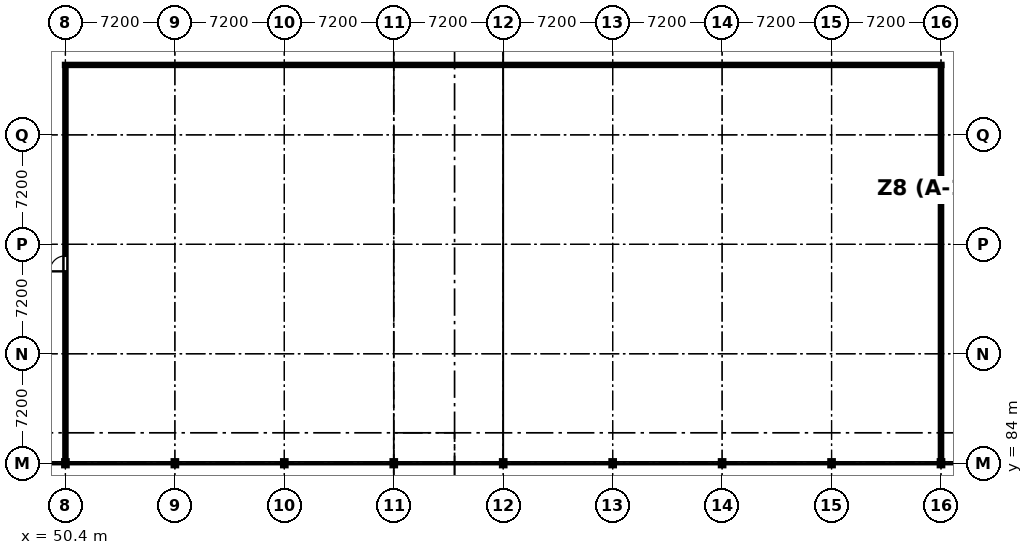
"""IFC4 building model, lengths in metres.
Left out: names, types, materials, properties, quantities, classifications, styles, units other than length and angle.
Written with IfcOpenShell. Run it as: python <this file> out.ifc"""

import sys

from ifc_helpers import new_model, si_unit, direction, frame, frame_2d, origin, origin_2d, place, context, subcontext, project, spatial, rectangle, i_section, extrude, element, fill, save


model = new_model("IFC4")
c1 = context("Model", 3, precision=1e-05, world=origin(), true_north=direction((0.0, 1.0)))
c2 = subcontext(c1, "Body", "Model", "MODEL_VIEW")
j1 = project(units=[si_unit("LENGTHUNIT", "METRE"), si_unit("PLANEANGLEUNIT", "RADIAN")], contexts=[c1])
p1 = place(None, origin())
s1 = spatial("IfcSite", under=j1, at=p1, CompositionType="ELEMENT")
p2 = place(p1, origin())
s2 = spatial("IfcBuilding", under=s1, at=p2, CompositionType="ELEMENT")
p3 = place(p2, frame((0.0, 0.0, 21.0)))
s3 = spatial("IfcBuildingStorey", under=s2, at=p3, CompositionType="ELEMENT", Elevation=21.0)
for number, where, z_axis, x_axis in (
    (1, (50.4, 84.0, 0.0), (0.0, 0.0, 1.0), (1.0, 0.0, 0.0)),
    (2, (57.6, 84.0, 0.0), (0.0, 0.0, 1.0), (1.0, 0.0, 0.0)),
    (3, (64.8, 84.0, 0.0), (0.0, 0.0, 1.0), (1.0, 0.0, 0.0)),
    (4, (72.0, 84.0, 0.0), (0.0, 0.0, 1.0), (1.0, 0.0, 0.0)),
    (5, (79.2, 84.0, 0.0), (0.0, 0.0, 1.0), (1.0, 0.0, 0.0)),
    (6, (86.4, 84.0, 0.0), (0.0, 0.0, 1.0), (1.0, 0.0, 0.0)),
    (7, (93.6, 84.0, 0.0), (0.0, 0.0, 1.0), (1.0, 0.0, 0.0)),
    (8, (100.8, 84.0, 0.0), (0.0, 0.0, 1.0), (1.0, 0.0, 0.0)),
    (9, (108.0, 84.0, 0.0), (0.0, 0.0, 1.0), (1.0, 0.0, 0.0)),
):
    element("IfcColumn", number, at=place(p3, frame(where, z_axis=z_axis, x_axis=x_axis)), inside=s3, PredefinedType="COLUMN", context=c2, shape_type="SweptSolid", body=[
        extrude(i_section(OverallWidth=0.257, OverallDepth=0.363, WebThickness=0.013, FlangeThickness=0.022, FilletRadius=0.015, at=origin_2d()), origin(), (0.0, 0.0, 1.0), 3.3),
    ])
p4 = place(p3, frame((50.32, 110.2, 0.0), z_axis=(0.0, 0.0, 1.0), x_axis=(1.0, 0.0, 0.0)))
e10 = element("IfcWall", 10, at=p4, inside=s3, PredefinedType="PARTITIONING", context=c2, shape_type="SweptSolid", body=[
    extrude(rectangle(XDim=57.76, YDim=0.11, at=frame_2d((28.88, 0.0))), origin(), (0.0, 0.0, 1.0), 2.5),
])
p5 = place(p3, frame((50.4, 84.122, 0.0), z_axis=(0.0, 0.0, 1.0), x_axis=(0.0, 1.0, 0.0)))
e11 = element("IfcWall", 11, at=p5, inside=s3, PredefinedType="PARTITIONING", context=c2, shape_type="SweptSolid", body=[
    extrude(rectangle(XDim=26.021, YDim=0.115, at=frame_2d((13.01, 0.0))), origin(), (0.0, 0.0, 1.0), 2.5),
])
p6 = place(p5, frame((12.5, 0.0, 0.0)))
e12 = element("IfcOpeningElement", 12, at=p6, cuts=e11, PredefinedType="OPENING", context=c2, shape_type="SweptSolid", body=[
    extrude(rectangle(XDim=1.02, YDim=2.16, at=frame_2d((0.51, 1.08))), frame((0.0, 0.067, 0.0), z_axis=(0.0, -1.0, 0.0), x_axis=(1.0, 0.0, 0.0)), (0.0, 0.0, 1.0), 0.135),
])
p7 = place(p5, frame((14.77, 0.0, 0.95)))
e13 = element("IfcOpeningElement", 13, at=p7, cuts=e11, PredefinedType="OPENING", context=c2, shape_type="SweptSolid", body=[
    extrude(rectangle(XDim=1.5, YDim=1.15, at=frame_2d((0.75, 0.575))), frame((0.0, 0.067, 0.0), z_axis=(0.0, -1.0, 0.0), x_axis=(1.0, 0.0, 0.0)), (0.0, 0.0, 1.0), 0.135),
])
p8 = place(p3, frame((108.0, 110.143, 0.0), z_axis=(0.0, 0.0, 1.0), x_axis=(0.0, -1.0, 0.0)))
e14 = element("IfcWall", 14, at=p8, inside=s3, PredefinedType="PARTITIONING", context=c2, shape_type="SweptSolid", body=[
    extrude(rectangle(XDim=26.021, YDim=0.12, at=frame_2d((13.01, 0.0))), origin(), (0.0, 0.0, 1.0), 2.5),
])
p9 = place(p6, origin())
e15 = element("IfcDoor", 15, at=p9, inside=s3, OperationType="SINGLE_SWING_LEFT", PredefinedType="DOOR", context=c2, shape_type="SweptSolid", body=[
    extrude(rectangle(XDim=1.02, YDim=2.16, at=frame_2d((0.51, 1.08))), frame((0.0, 0.025, 0.0), z_axis=(0.0, -1.0, 0.0), x_axis=(1.0, 0.0, 0.0)), (0.0, 0.0, 1.0), 0.05),
])
fill(e12, e15)
p10 = place(p7, origin())
e16 = element("IfcWindow", 16, at=p10, inside=s3, PartitioningType="SINGLE_PANEL", PredefinedType="WINDOW", context=c2, shape_type="SweptSolid", body=[
    extrude(rectangle(XDim=1.5, YDim=1.15, at=frame_2d((0.75, 0.575))), frame((0.0, 0.03, 0.0), z_axis=(0.0, -1.0, 0.0), x_axis=(1.0, 0.0, 0.0)), (0.0, 0.0, 1.0), 0.06),
])
fill(e13, e16)
save(model, sys.argv[1])
